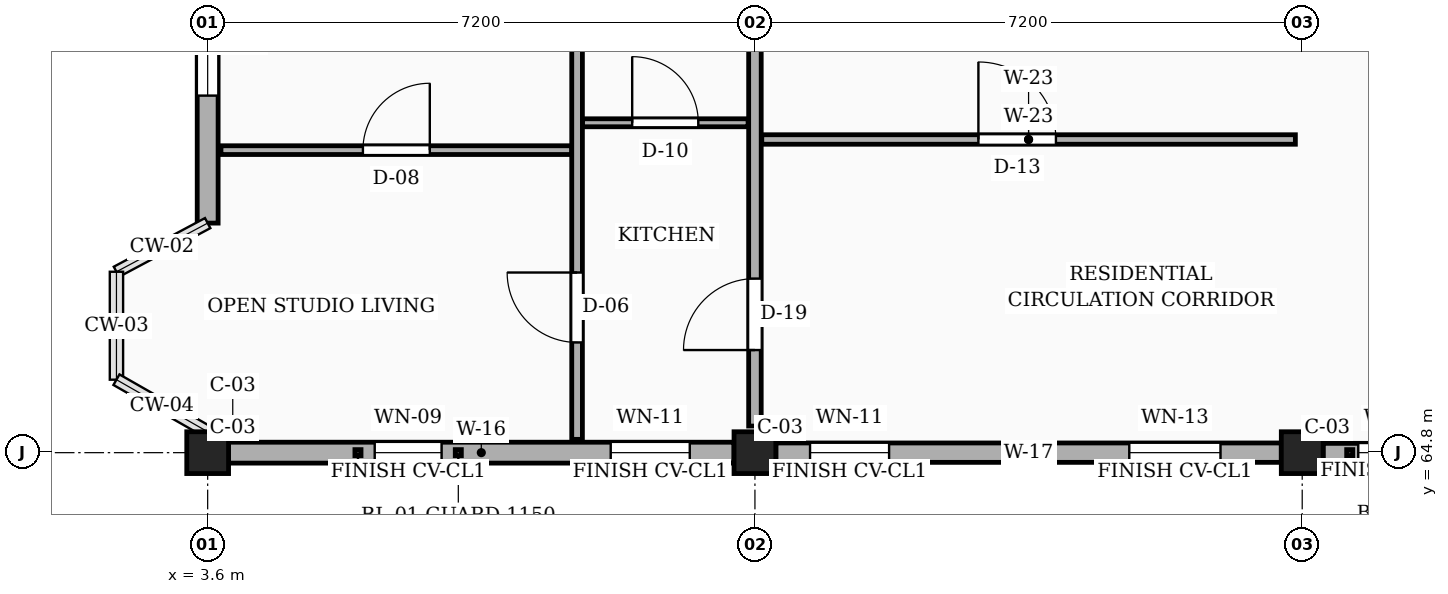
"""IFC4 building model, lengths in metres.
Left out: names, types, materials, properties, quantities, classifications, styles, units other than length and angle.
Written with IfcOpenShell. Run it as: python <this file> out.ifc"""

import sys

from ifc_helpers import new_model, si_unit, direction, frame, frame_2d, origin, origin_2d, place, context, subcontext, project, spatial, rectangle, extrude, element, fill, save


model = new_model("IFC4")
c1 = context("Model", 3, precision=1e-05, world=origin(), true_north=direction((0.0, 1.0)))
c2 = subcontext(c1, "Body", "Model", "MODEL_VIEW")
j1 = project(units=[si_unit("LENGTHUNIT", "METRE"), si_unit("PLANEANGLEUNIT", "RADIAN")], contexts=[c1])
p1 = place(None, origin())
s1 = spatial("IfcSite", under=j1, at=p1, CompositionType="ELEMENT")
p2 = place(p1, origin())
s2 = spatial("IfcBuilding", under=s1, at=p2, CompositionType="ELEMENT")
p3 = place(p2, frame((0.0, 0.0, 13.95)))
s3 = spatial("IfcBuildingStorey", under=s2, at=p3, CompositionType="ELEMENT", Elevation=13.95)
for number, where, z_axis, x_axis in (
    (1, (3.6, 64.8, 0.0), (0.0, 0.0, 1.0), (1.0, 0.0, 0.0)),
    (2, (10.8, 64.8, 0.0), (0.0, 0.0, 1.0), (1.0, 0.0, 0.0)),
    (3, (18.0, 64.8, 0.0), (0.0, 0.0, 1.0), (1.0, 0.0, 0.0)),
):
    element("IfcColumn", number, at=place(p3, frame(where, z_axis=z_axis, x_axis=x_axis)), inside=s3, PredefinedType="COLUMN", context=c2, shape_type="SweptSolid", body=[
        extrude(rectangle(XDim=0.55, YDim=0.55, at=origin_2d()), origin(), (0.0, 0.0, 1.0), 3.15),
    ])
p4 = place(p3, frame((3.875, 64.8, 0.0), z_axis=(0.0, 0.0, 1.0), x_axis=(1.0, 0.0, 0.0)))
e4 = element("IfcWall", 4, at=p4, inside=s3, PredefinedType="SOLIDWALL", context=c2, shape_type="SweptSolid", body=[
    extrude(rectangle(XDim=6.65, YDim=0.275, at=frame_2d((3.325, 0.0))), origin(), (0.0, 0.0, 1.0), 2.48),
])
p5 = place(p4, frame((1.923, 0.0, 0.78)))
e5 = element("IfcOpeningElement", 5, at=p5, cuts=e4, PredefinedType="OPENING", context=c2, shape_type="SweptSolid", body=[
    extrude(rectangle(XDim=0.88, YDim=1.26, at=frame_2d((0.44, 0.63))), frame((0.0, 0.147, 0.0), z_axis=(0.0, -1.0, 0.0), x_axis=(1.0, 0.0, 0.0)), (0.0, 0.0, 1.0), 0.295),
])
p6 = place(p4, frame((5.028, 0.0, 0.78)))
e6 = element("IfcOpeningElement", 6, at=p6, cuts=e4, PredefinedType="OPENING", context=c2, shape_type="SweptSolid", body=[
    extrude(rectangle(XDim=1.04, YDim=1.26, at=frame_2d((0.52, 0.63))), frame((0.0, 0.147, 0.0), z_axis=(0.0, -1.0, 0.0), x_axis=(1.0, 0.0, 0.0)), (0.0, 0.0, 1.0), 0.295),
])
p7 = place(p3, frame((11.075, 64.8, 0.0), z_axis=(0.0, 0.0, 1.0), x_axis=(1.0, 0.0, 0.0)))
e7 = element("IfcWall", 7, at=p7, inside=s3, PredefinedType="SOLIDWALL", context=c2, shape_type="SweptSolid", body=[
    extrude(rectangle(XDim=6.65, YDim=0.255, at=frame_2d((3.325, 0.0))), origin(), (0.0, 0.0, 1.0), 2.48),
])
p8 = place(p7, frame((0.45, 0.0, 0.78)))
e8 = element("IfcOpeningElement", 8, at=p8, cuts=e7, PredefinedType="OPENING", context=c2, shape_type="SweptSolid", body=[
    extrude(rectangle(XDim=1.04, YDim=1.26, at=frame_2d((0.52, 0.63))), frame((0.0, 0.137, 0.0), z_axis=(0.0, -1.0, 0.0), x_axis=(1.0, 0.0, 0.0)), (0.0, 0.0, 1.0), 0.275),
])
p9 = place(p7, frame((4.65, 0.0, 0.78)))
e9 = element("IfcOpeningElement", 9, at=p9, cuts=e7, PredefinedType="OPENING", context=c2, shape_type="SweptSolid", body=[
    extrude(rectangle(XDim=1.2, YDim=1.26, at=frame_2d((0.6, 0.63))), frame((0.0, 0.137, 0.0), z_axis=(0.0, -1.0, 0.0), x_axis=(1.0, 0.0, 0.0)), (0.0, 0.0, 1.0), 0.275),
])
p10 = place(p3, frame((18.275, 64.8, 0.0), z_axis=(0.0, 0.0, 1.0), x_axis=(1.0, 0.0, 0.0)))
e10 = element("IfcWall", 10, at=p10, inside=s3, PredefinedType="SOLIDWALL", context=c2, shape_type="SweptSolid", body=[
    extrude(rectangle(XDim=6.65, YDim=0.245, at=frame_2d((3.325, 0.0))), origin(), (0.0, 0.0, 1.0), 2.48),
])
p11 = place(p10, frame((0.462, 0.0, 0.78)))
e11 = element("IfcOpeningElement", 11, at=p11, cuts=e10, PredefinedType="OPENING", context=c2, shape_type="SweptSolid", body=[
    extrude(rectangle(XDim=1.04, YDim=1.26, at=frame_2d((0.52, 0.63))), frame((0.0, 0.133, 0.0), z_axis=(0.0, -1.0, 0.0), x_axis=(1.0, 0.0, 0.0)), (0.0, 0.0, 1.0), 0.265),
])
p12 = place(p10, frame((2.135, 0.0, 0.78)))
e12 = element("IfcOpeningElement", 12, at=p12, cuts=e10, PredefinedType="OPENING", context=c2, shape_type="SweptSolid", body=[
    extrude(rectangle(XDim=1.36, YDim=1.26, at=frame_2d((0.68, 0.63))), frame((0.0, 0.133, 0.0), z_axis=(0.0, -1.0, 0.0), x_axis=(1.0, 0.0, 0.0)), (0.0, 0.0, 1.0), 0.265),
])
p13 = place(p10, frame((4.708, 0.0, 0.78)))
e13 = element("IfcOpeningElement", 13, at=p13, cuts=e10, PredefinedType="OPENING", context=c2, shape_type="SweptSolid", body=[
    extrude(rectangle(XDim=0.9, YDim=1.36, at=frame_2d((0.45, 0.68))), frame((0.0, 0.133, 0.0), z_axis=(0.0, -1.0, 0.0), x_axis=(1.0, 0.0, 0.0)), (0.0, 0.0, 1.0), 0.265),
])
p14 = place(p3, frame((3.6, 71.725, 0.0), z_axis=(0.0, 0.0, 1.0), x_axis=(0.0, -1.0, 0.0)))
e14 = element("IfcWall", 14, at=p14, inside=s3, PredefinedType="SOLIDWALL", context=c2, shape_type="SweptSolid", body=[
    extrude(rectangle(XDim=3.905, YDim=0.275, at=frame_2d((1.953, 0.0))), origin(), (0.0, 0.0, 1.0), 2.48),
])
p15 = place(p14, frame((0.827, 0.0, 0.78)))
e15 = element("IfcOpeningElement", 15, at=p15, cuts=e14, PredefinedType="OPENING", context=c2, shape_type="SweptSolid", body=[
    extrude(rectangle(XDim=1.4, YDim=1.15, at=frame_2d((0.7, 0.575))), frame((0.0, 0.147, 0.0), z_axis=(0.0, -1.0, 0.0), x_axis=(1.0, 0.0, 0.0)), (0.0, 0.0, 1.0), 0.295),
])
p16 = place(p3, frame((10.8, 65.15, 0.0), z_axis=(0.0, 0.0, 1.0), x_axis=(0.0, 1.0, 0.0)))
e16 = element("IfcWall", 16, at=p16, inside=s3, PredefinedType="PARTITIONING", context=c2, shape_type="SweptSolid", body=[
    extrude(rectangle(XDim=6.5, YDim=0.165, at=frame_2d((3.25, 0.0))), origin(), (0.0, 0.0, 1.0), 2.345),
])
p17 = place(p16, frame((1.0, 0.0, 0.0)))
e17 = element("IfcOpeningElement", 17, at=p17, cuts=e16, PredefinedType="OPENING", context=c2, shape_type="SweptSolid", body=[
    extrude(rectangle(XDim=0.94, YDim=2.12, at=frame_2d((0.47, 1.06))), frame((0.0, 0.093, 0.0), z_axis=(0.0, -1.0, 0.0), x_axis=(1.0, 0.0, 0.0)), (0.0, 0.0, 1.0), 0.185),
])
p18 = place(p3, frame((10.89, 68.92, 0.0), z_axis=(0.0, 0.0, 1.0), x_axis=(1.0, 0.0, 0.0)))
e18 = element("IfcWall", 18, at=p18, inside=s3, PredefinedType="PARTITIONING", context=c2, shape_type="SweptSolid", body=[
    extrude(rectangle(XDim=7.02, YDim=0.125, at=frame_2d((3.51, 0.0))), origin(), (0.0, 0.0, 1.0), 2.345),
])
p19 = place(p18, frame((2.85, 0.0, 0.0)))
e19 = element("IfcOpeningElement", 19, at=p19, cuts=e18, PredefinedType="OPENING", context=c2, shape_type="SweptSolid", body=[
    extrude(rectangle(XDim=1.02, YDim=2.15, at=frame_2d((0.51, 1.075))), frame((0.0, 0.073, 0.0), z_axis=(0.0, -1.0, 0.0), x_axis=(1.0, 0.0, 0.0)), (0.0, 0.0, 1.0), 0.145),
])
p20 = place(p3, frame((3.775, 68.78, 0.0), z_axis=(0.0, 0.0, 1.0), x_axis=(1.0, 0.0, 0.0)))
e20 = element("IfcWall", 20, at=p20, inside=s3, PredefinedType="PARTITIONING", context=c2, shape_type="SweptSolid", body=[
    extrude(rectangle(XDim=4.615, YDim=0.115, at=frame_2d((2.308, 0.0))), origin(), (0.0, 0.0, 1.0), 2.345),
])
p21 = place(p20, frame((1.867, 0.0, 0.0)))
e21 = element("IfcOpeningElement", 21, at=p21, cuts=e20, PredefinedType="OPENING", context=c2, shape_type="SweptSolid", body=[
    extrude(rectangle(XDim=0.88, YDim=2.08, at=frame_2d((0.44, 1.04))), frame((0.0, 0.067, 0.0), z_axis=(0.0, -1.0, 0.0), x_axis=(1.0, 0.0, 0.0)), (0.0, 0.0, 1.0), 0.135),
])
p22 = place(p3, frame((8.53, 69.14, 0.0), z_axis=(0.0, 0.0, 1.0), x_axis=(1.0, 0.0, 0.0)))
e22 = element("IfcWall", 22, at=p22, inside=s3, PredefinedType="PARTITIONING", context=c2, shape_type="SweptSolid", body=[
    extrude(rectangle(XDim=2.18, YDim=0.105, at=frame_2d((1.09, 0.0))), origin(), (0.0, 0.0, 1.0), 2.345),
])
p23 = place(p22, frame((0.655, 0.0, 0.0)))
e23 = element("IfcOpeningElement", 23, at=p23, cuts=e22, PredefinedType="OPENING", context=c2, shape_type="SweptSolid", body=[
    extrude(rectangle(XDim=0.87, YDim=2.05, at=frame_2d((0.435, 1.025))), frame((0.0, 0.062, 0.0), z_axis=(0.0, -1.0, 0.0), x_axis=(1.0, 0.0, 0.0)), (0.0, 0.0, 1.0), 0.125),
])
p24 = place(p3, frame((8.46, 64.975, 0.0), z_axis=(0.0, 0.0, 1.0), x_axis=(0.0, 1.0, 0.0)))
e24 = element("IfcWall", 24, at=p24, inside=s3, PredefinedType="PARTITIONING", context=c2, shape_type="SweptSolid", body=[
    extrude(rectangle(XDim=6.885, YDim=0.14, at=frame_2d((3.442, 0.0))), origin(), (0.0, 0.0, 1.0), 2.345),
])
p25 = place(p24, frame((1.275, 0.0, 0.0)))
e25 = element("IfcOpeningElement", 25, at=p25, cuts=e24, PredefinedType="OPENING", context=c2, shape_type="SweptSolid", body=[
    extrude(rectangle(XDim=0.92, YDim=2.1, at=frame_2d((0.46, 1.05))), frame((0.0, 0.08, 0.0), z_axis=(0.0, -1.0, 0.0), x_axis=(1.0, 0.0, 0.0)), (0.0, 0.0, 1.0), 0.16),
])
p26 = place(p5, origin())
e26 = element("IfcWindow", 26, at=p26, inside=s3, PartitioningType="SINGLE_PANEL", PredefinedType="WINDOW", context=c2, shape_type="SweptSolid", body=[
    extrude(rectangle(XDim=0.88, YDim=1.26, at=frame_2d((0.44, 0.63))), frame((0.0, 0.03, 0.0), z_axis=(0.0, -1.0, 0.0), x_axis=(1.0, 0.0, 0.0)), (0.0, 0.0, 1.0), 0.06),
])
fill(e5, e26)
p27 = place(p6, origin())
e27 = element("IfcWindow", 27, at=p27, inside=s3, PartitioningType="SINGLE_PANEL", PredefinedType="WINDOW", context=c2, shape_type="SweptSolid", body=[
    extrude(rectangle(XDim=1.04, YDim=1.26, at=frame_2d((0.52, 0.63))), frame((0.0, 0.03, 0.0), z_axis=(0.0, -1.0, 0.0), x_axis=(1.0, 0.0, 0.0)), (0.0, 0.0, 1.0), 0.06),
])
fill(e6, e27)
p28 = place(p8, origin())
e28 = element("IfcWindow", 28, at=p28, inside=s3, PartitioningType="SINGLE_PANEL", PredefinedType="WINDOW", context=c2, shape_type="SweptSolid", body=[
    extrude(rectangle(XDim=1.04, YDim=1.26, at=frame_2d((0.52, 0.63))), frame((0.0, 0.03, 0.0), z_axis=(0.0, -1.0, 0.0), x_axis=(1.0, 0.0, 0.0)), (0.0, 0.0, 1.0), 0.06),
])
fill(e8, e28)
p29 = place(p9, origin())
e29 = element("IfcWindow", 29, at=p29, inside=s3, PartitioningType="SINGLE_PANEL", PredefinedType="WINDOW", context=c2, shape_type="SweptSolid", body=[
    extrude(rectangle(XDim=1.2, YDim=1.26, at=frame_2d((0.6, 0.63))), frame((0.0, 0.03, 0.0), z_axis=(0.0, -1.0, 0.0), x_axis=(1.0, 0.0, 0.0)), (0.0, 0.0, 1.0), 0.06),
])
fill(e9, e29)
p30 = place(p11, origin())
e30 = element("IfcWindow", 30, at=p30, inside=s3, PartitioningType="SINGLE_PANEL", PredefinedType="WINDOW", context=c2, shape_type="SweptSolid", body=[
    extrude(rectangle(XDim=1.04, YDim=1.26, at=frame_2d((0.52, 0.63))), frame((0.0, 0.03, 0.0), z_axis=(0.0, -1.0, 0.0), x_axis=(1.0, 0.0, 0.0)), (0.0, 0.0, 1.0), 0.06),
])
fill(e11, e30)
p31 = place(p15, origin())
e31 = element("IfcWindow", 31, at=p31, inside=s3, PartitioningType="SINGLE_PANEL", PredefinedType="WINDOW", context=c2, shape_type="SweptSolid", body=[
    extrude(rectangle(XDim=1.4, YDim=1.15, at=frame_2d((0.7, 0.575))), frame((0.0, 0.03, 0.0), z_axis=(0.0, -1.0, 0.0), x_axis=(1.0, 0.0, 0.0)), (0.0, 0.0, 1.0), 0.06),
])
fill(e15, e31)
p32 = place(p17, origin())
e32 = element("IfcDoor", 32, at=p32, inside=s3, OperationType="SINGLE_SWING_LEFT", PredefinedType="DOOR", context=c2, shape_type="SweptSolid", body=[
    extrude(rectangle(XDim=0.94, YDim=2.12, at=frame_2d((0.47, 1.06))), frame((0.0, 0.025, 0.0), z_axis=(0.0, -1.0, 0.0), x_axis=(1.0, 0.0, 0.0)), (0.0, 0.0, 1.0), 0.05),
])
fill(e17, e32)
p33 = place(p19, origin())
e33 = element("IfcDoor", 33, at=p33, inside=s3, OperationType="SINGLE_SWING_LEFT", PredefinedType="DOOR", context=c2, shape_type="SweptSolid", body=[
    extrude(rectangle(XDim=1.02, YDim=2.15, at=frame_2d((0.51, 1.075))), frame((0.0, 0.025, 0.0), z_axis=(0.0, -1.0, 0.0), x_axis=(1.0, 0.0, 0.0)), (0.0, 0.0, 1.0), 0.05),
])
fill(e19, e33)
p34 = place(p21, origin())
e34 = element("IfcDoor", 34, at=p34, inside=s3, OperationType="SINGLE_SWING_RIGHT", PredefinedType="DOOR", context=c2, shape_type="SweptSolid", body=[
    extrude(rectangle(XDim=0.88, YDim=2.08, at=frame_2d((0.44, 1.04))), frame((0.0, 0.025, 0.0), z_axis=(0.0, -1.0, 0.0), x_axis=(1.0, 0.0, 0.0)), (0.0, 0.0, 1.0), 0.05),
])
fill(e21, e34)
p35 = place(p23, origin())
e35 = element("IfcDoor", 35, at=p35, inside=s3, OperationType="SINGLE_SWING_LEFT", PredefinedType="DOOR", context=c2, shape_type="SweptSolid", body=[
    extrude(rectangle(XDim=0.87, YDim=2.05, at=frame_2d((0.435, 1.025))), frame((0.0, 0.025, 0.0), z_axis=(0.0, -1.0, 0.0), x_axis=(1.0, 0.0, 0.0)), (0.0, 0.0, 1.0), 0.05),
])
fill(e23, e35)
p36 = place(p25, origin())
e36 = element("IfcDoor", 36, at=p36, inside=s3, OperationType="SINGLE_SWING_RIGHT", PredefinedType="DOOR", context=c2, shape_type="SweptSolid", body=[
    extrude(rectangle(XDim=0.92, YDim=2.1, at=frame_2d((0.46, 1.05))), frame((0.0, 0.025, 0.0), z_axis=(0.0, -1.0, 0.0), x_axis=(1.0, 0.0, 0.0)), (0.0, 0.0, 1.0), 0.05),
])
fill(e25, e36)
save(model, sys.argv[1])
